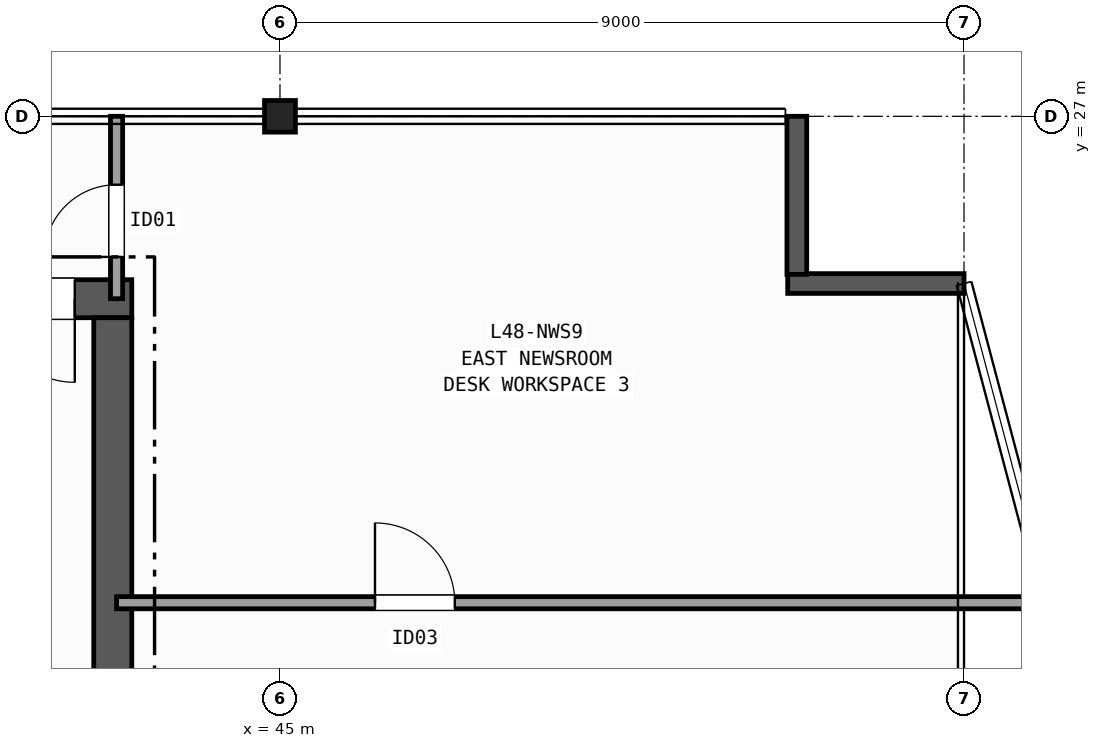
"""IFC4 building model, lengths in metres.
Left out: names, types, materials, properties, quantities, classifications, styles, units other than length and angle.
Written with IfcOpenShell. Run it as: python <this file> out.ifc"""

import sys

from ifc_helpers import new_model, si_unit, direction, frame, frame_2d, origin, origin_2d, place, context, subcontext, project, spatial, rectangle, i_section, extrude, element, fill, save


model = new_model("IFC4")
c1 = context("Model", 3, precision=1e-05, world=origin(), true_north=direction((0.0, 1.0)))
c2 = subcontext(c1, "Body", "Model", "MODEL_VIEW")
j1 = project(units=[si_unit("LENGTHUNIT", "METRE"), si_unit("PLANEANGLEUNIT", "RADIAN")], contexts=[c1])
p1 = place(None, origin())
s1 = spatial("IfcSite", under=j1, at=p1, CompositionType="ELEMENT")
p2 = place(p1, origin())
s2 = spatial("IfcBuilding", under=s1, at=p2, CompositionType="ELEMENT")
p3 = place(p2, frame((0.0, 0.0, 192.7)))
s3 = spatial("IfcBuildingStorey", under=s2, at=p3, CompositionType="ELEMENT", Elevation=192.7)
p4 = place(p3, frame((45.0, 27.0, 0.0), z_axis=(0.0, 0.0, 1.0), x_axis=(1.0, 0.0, 0.0)))
e1 = element("IfcColumn", 1, at=p4, inside=s3, PredefinedType="COLUMN", context=c2, shape_type="SweptSolid", body=[
    extrude(i_section(OverallWidth=0.406, OverallDepth=0.416, WebThickness=0.03, FlangeThickness=0.048, FilletRadius=0.015, at=origin_2d()), origin(), (0.0, 0.0, 1.0), 3.7),
])
p5 = place(p3, frame((54.0, 24.8, 0.0), z_axis=(0.0, 0.0, 1.0), x_axis=(-1.0, 0.0, 0.0)))
e2 = element("IfcWall", 2, at=p5, inside=s3, PredefinedType="SOLIDWALL", context=c2, shape_type="SweptSolid", body=[
    extrude(rectangle(XDim=2.32, YDim=0.26, at=frame_2d((1.16, 0.0))), origin(), (0.0, 0.0, 1.0), 3.37),
])
p6 = place(p3, frame((51.8, 24.92, 0.0), z_axis=(0.0, 0.0, 1.0), x_axis=(0.0, 1.0, 0.0)))
e3 = element("IfcWall", 3, at=p6, inside=s3, PredefinedType="SOLIDWALL", context=c2, shape_type="SweptSolid", body=[
    extrude(rectangle(XDim=2.08, YDim=0.26, at=frame_2d((1.04, 0.0))), origin(), (0.0, 0.0, 1.0), 3.37),
])
p7 = place(p3, frame((43.05, 24.6, 0.0), z_axis=(0.0, 0.0, 1.0), x_axis=(-1.0, 0.0, 0.0)))
e4 = element("IfcWall", 4, at=p7, inside=s3, PredefinedType="SHEAR", context=c2, shape_type="SweptSolid", body=[
    extrude(rectangle(XDim=13.9, YDim=0.5, at=frame_2d((6.95, 0.0))), origin(), (0.0, 0.0, 1.0), 3.37),
])
p8 = place(p7, frame((0.75, 0.0, 0.0)))
e5 = element("IfcOpeningElement", 5, at=p8, cuts=e4, PredefinedType="OPENING", context=c2, shape_type="SweptSolid", body=[
    extrude(rectangle(XDim=1.1, YDim=2.15, at=frame_2d((0.55, 1.075))), frame((0.0, 0.26, 0.0), z_axis=(0.0, -1.0, 0.0), x_axis=(1.0, 0.0, 0.0)), (0.0, 0.0, 1.0), 0.52),
])
p9 = place(p7, frame((2.25, 0.0, 0.0)))
e6 = element("IfcOpeningElement", 6, at=p9, cuts=e4, PredefinedType="OPENING", context=c2, shape_type="SweptSolid", body=[
    extrude(rectangle(XDim=0.9, YDim=2.1, at=frame_2d((0.45, 1.05))), frame((0.0, 0.26, 0.0), z_axis=(0.0, -1.0, 0.0), x_axis=(1.0, 0.0, 0.0)), (0.0, 0.0, 1.0), 0.52),
])
p10 = place(p7, frame((3.55, 0.0, 0.0)))
e7 = element("IfcOpeningElement", 7, at=p10, cuts=e4, PredefinedType="OPENING", context=c2, shape_type="SweptSolid", body=[
    extrude(rectangle(XDim=0.9, YDim=2.1, at=frame_2d((0.45, 1.05))), frame((0.0, 0.26, 0.0), z_axis=(0.0, -1.0, 0.0), x_axis=(1.0, 0.0, 0.0)), (0.0, 0.0, 1.0), 0.52),
])
p11 = place(p7, frame((4.9, 0.0, 0.0)))
e8 = element("IfcOpeningElement", 8, at=p11, cuts=e4, PredefinedType="OPENING", context=c2, shape_type="SweptSolid", body=[
    extrude(rectangle(XDim=0.9, YDim=2.1, at=frame_2d((0.45, 1.05))), frame((0.0, 0.26, 0.0), z_axis=(0.0, -1.0, 0.0), x_axis=(1.0, 0.0, 0.0)), (0.0, 0.0, 1.0), 0.52),
])
p12 = place(p3, frame((42.8, 11.45, 0.0), z_axis=(0.0, 0.0, 1.0), x_axis=(0.0, 1.0, 0.0)))
e9 = element("IfcWall", 9, at=p12, inside=s3, PredefinedType="SHEAR", context=c2, shape_type="SweptSolid", body=[
    extrude(rectangle(XDim=12.9, YDim=0.5, at=frame_2d((6.45, 0.0))), origin(), (0.0, 0.0, 1.0), 3.37),
])
p13 = place(p3, frame((42.85, 24.6, 0.0), z_axis=(0.0, 0.0, 1.0), x_axis=(0.0, 1.0, 0.0)))
e10 = element("IfcWall", 10, at=p13, inside=s3, PredefinedType="PARTITIONING", context=c2, shape_type="SweptSolid", body=[
    extrude(rectangle(XDim=2.4, YDim=0.16, at=frame_2d((1.2, 0.0))), origin(), (0.0, 0.0, 1.0), 2.584),
])
p14 = place(p13, frame((0.55, 0.0, 0.0)))
e11 = element("IfcOpeningElement", 11, at=p14, cuts=e10, PredefinedType="OPENING", context=c2, shape_type="SweptSolid", body=[
    extrude(rectangle(XDim=0.95, YDim=2.1, at=frame_2d((0.475, 1.05))), frame((0.0, 0.09, 0.0), z_axis=(0.0, -1.0, 0.0), x_axis=(1.0, 0.0, 0.0)), (0.0, 0.0, 1.0), 0.18),
])
p15 = place(p3, frame((42.85, 20.6, 0.0), z_axis=(0.0, 0.0, 1.0), x_axis=(1.0, 0.0, 0.0)))
e12 = element("IfcWall", 12, at=p15, inside=s3, PredefinedType="PARTITIONING", context=c2, shape_type="SweptSolid", body=[
    extrude(rectangle(XDim=12.262, YDim=0.16, at=frame_2d((6.131, 0.0))), origin(), (0.0, 0.0, 1.0), 3.37),
])
p16 = place(p15, frame((3.4, 0.0, 0.0)))
e13 = element("IfcOpeningElement", 13, at=p16, cuts=e12, PredefinedType="OPENING", context=c2, shape_type="SweptSolid", body=[
    extrude(rectangle(XDim=1.05, YDim=2.15, at=frame_2d((0.525, 1.075))), frame((0.0, 0.09, 0.0), z_axis=(0.0, -1.0, 0.0), x_axis=(1.0, 0.0, 0.0)), (0.0, 0.0, 1.0), 0.18),
])
p17 = place(p8, origin())
e14 = element("IfcDoor", 14, at=p17, inside=s3, OperationType="SINGLE_SWING_LEFT", PredefinedType="DOOR", context=c2, shape_type="SweptSolid", body=[
    extrude(rectangle(XDim=1.1, YDim=2.15, at=frame_2d((0.55, 1.075))), frame((0.0, 0.025, 0.0), z_axis=(0.0, -1.0, 0.0), x_axis=(1.0, 0.0, 0.0)), (0.0, 0.0, 1.0), 0.05),
])
fill(e5, e14)
p18 = place(p14, origin())
e15 = element("IfcDoor", 15, at=p18, inside=s3, OperationType="SINGLE_SWING_LEFT", PredefinedType="DOOR", context=c2, shape_type="SweptSolid", body=[
    extrude(rectangle(XDim=0.95, YDim=2.1, at=frame_2d((0.475, 1.05))), frame((0.0, 0.025, 0.0), z_axis=(0.0, -1.0, 0.0), x_axis=(1.0, 0.0, 0.0)), (0.0, 0.0, 1.0), 0.05),
])
fill(e11, e15)
p19 = place(p16, origin())
e16 = element("IfcDoor", 16, at=p19, inside=s3, OperationType="SINGLE_SWING_LEFT", PredefinedType="DOOR", context=c2, shape_type="SweptSolid", body=[
    extrude(rectangle(XDim=1.05, YDim=2.15, at=frame_2d((0.525, 1.075))), frame((0.0, 0.025, 0.0), z_axis=(0.0, -1.0, 0.0), x_axis=(1.0, 0.0, 0.0)), (0.0, 0.0, 1.0), 0.05),
])
fill(e13, e16)
save(model, sys.argv[1])
